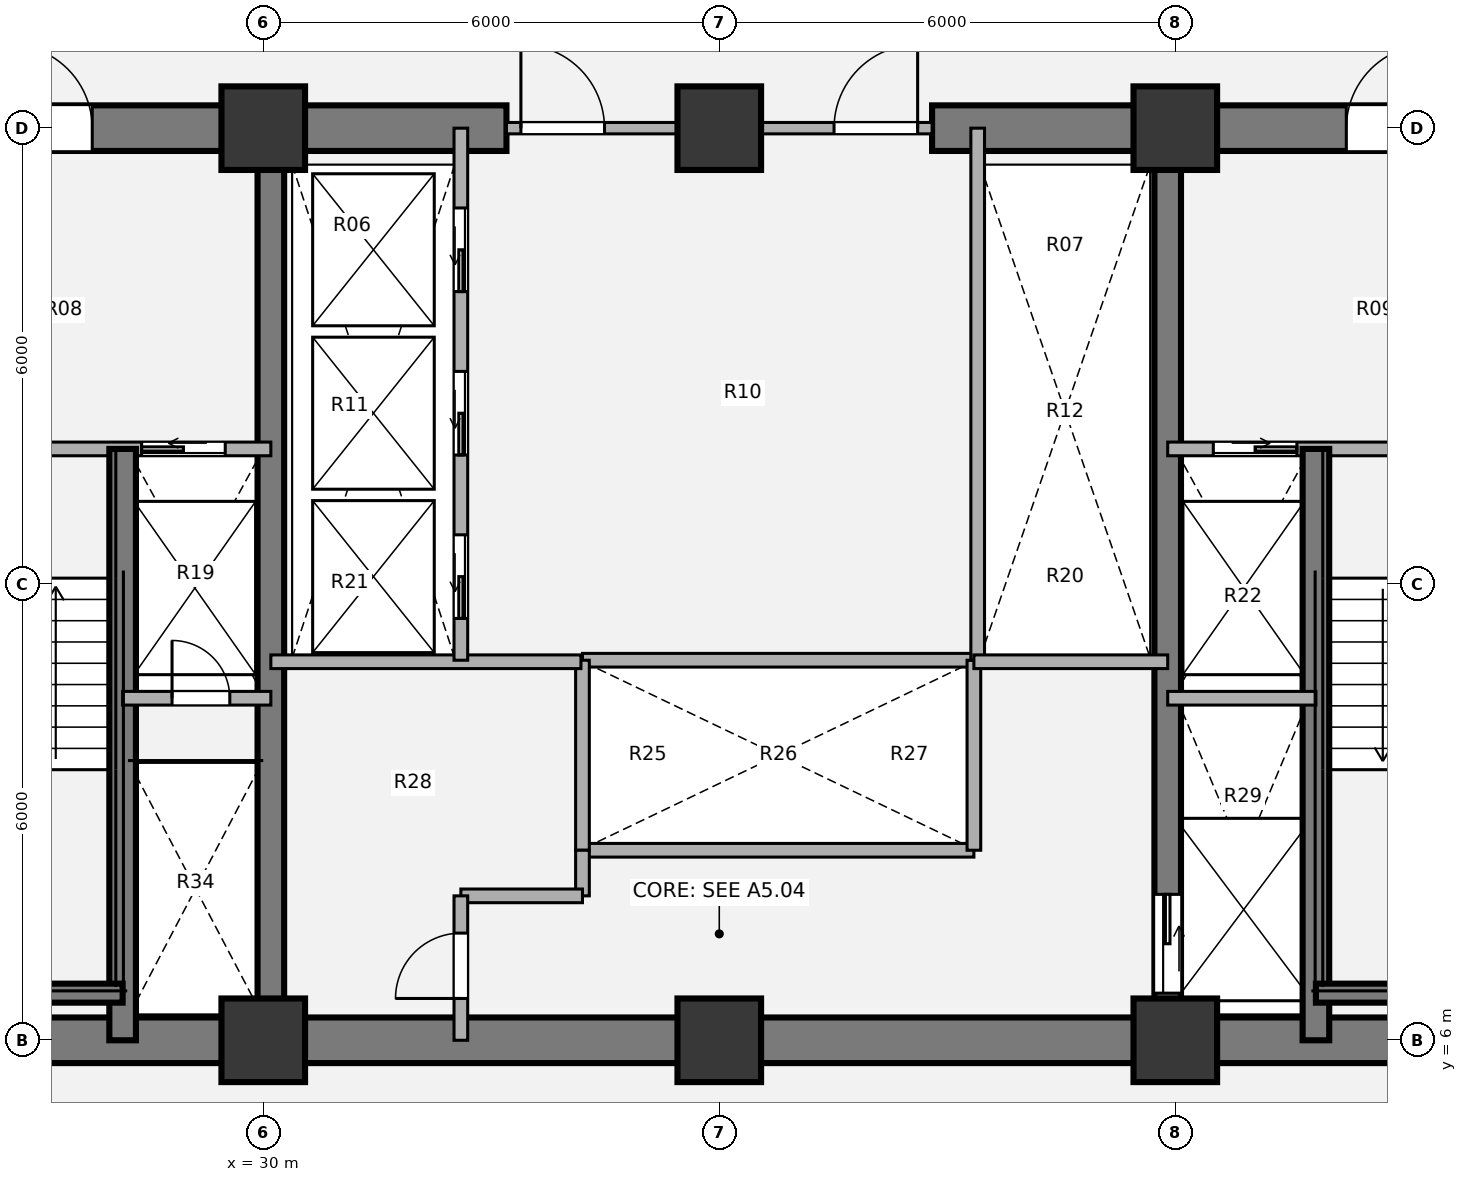
"""IFC4 building model, lengths in metres.
Left out: names, types, materials, properties, quantities, classifications, styles, units other than length and angle.
Written with IfcOpenShell. Run it as: python <this file> out.ifc"""

import sys

from ifc_helpers import new_model, si_unit, direction, frame, frame_2d, origin, origin_2d, place, context, subcontext, project, spatial, rectangle, extrude, source, transform, mapped, element, fill, save


model = new_model("IFC4")
c1 = context("Model", 3, precision=1e-05, world=origin(), true_north=direction((0.0, 1.0)))
c2 = subcontext(c1, "Body", "Model", "MODEL_VIEW")
j1 = project(units=[si_unit("LENGTHUNIT", "METRE"), si_unit("PLANEANGLEUNIT", "RADIAN")], contexts=[c1])
p1 = place(None, origin())
s1 = spatial("IfcSite", under=j1, at=p1, CompositionType="ELEMENT")
p2 = place(p1, origin())
s2 = spatial("IfcBuilding", under=s1, at=p2, CompositionType="ELEMENT")
p3 = place(p2, frame((0.0, 0.0, 53.46)))
s3 = spatial("IfcBuildingStorey", under=s2, at=p3, CompositionType="ELEMENT", Elevation=53.46)
m1 = source(origin(), c2, "Body", "SweptSolid", [
    extrude(rectangle(XDim=1.1, YDim=1.1, at=origin_2d()), origin(), (0.0, 0.0, 1.0), 3.78),
])
for number, where, z_axis, x_axis in (
    (1, (30.0, 6.0, 0.0), (0.0, 0.0, 1.0), (1.0, 0.0, 0.0)),
    (2, (36.0, 6.0, 0.0), (0.0, 0.0, 1.0), (1.0, 0.0, 0.0)),
    (3, (42.0, 6.0, 0.0), (0.0, 0.0, 1.0), (1.0, 0.0, 0.0)),
    (4, (30.0, 18.0, 0.0), (0.0, 0.0, 1.0), (1.0, 0.0, 0.0)),
    (5, (36.0, 18.0, 0.0), (0.0, 0.0, 1.0), (1.0, 0.0, 0.0)),
    (6, (42.0, 18.0, 0.0), (0.0, 0.0, 1.0), (1.0, 0.0, 0.0)),
):
    element("IfcColumn", number, at=place(p3, frame(where, z_axis=z_axis, x_axis=x_axis)), inside=s3, PredefinedType="COLUMN", context=c2, shape_type="MappedRepresentation", body=[
        mapped(m1, transform((0.0, 0.0, 0.0), x_axis=(1.0, 0.0, 0.0), y_axis=(0.0, 1.0, 0.0), z_axis=(0.0, 0.0, 1.0), scale=1.0)),
    ])
p4 = place(p3, frame((48.3, 6.0, 0.0), z_axis=(0.0, 0.0, 1.0), x_axis=(-1.0, 0.0, 0.0)))
e7 = element("IfcWall", 7, at=p4, inside=s3, PredefinedType="SHEAR", context=c2, shape_type="SweptSolid", body=[
    extrude(rectangle(XDim=24.6, YDim=0.6, at=frame_2d((12.3, 0.0))), origin(), (0.0, 0.0, 1.0), 3.78),
])
p5 = place(p3, frame((23.7, 18.0, 0.0), z_axis=(0.0, 0.0, 1.0), x_axis=(1.0, 0.0, 0.0)))
e8 = element("IfcWall", 8, at=p5, inside=s3, PredefinedType="SHEAR", context=c2, shape_type="SweptSolid", body=[
    extrude(rectangle(XDim=9.5, YDim=0.6, at=frame_2d((4.75, 0.0))), origin(), (0.0, 0.0, 1.0), 3.78),
])
p6 = place(p5, frame((2.95, 0.0, 0.0)))
e9 = element("IfcOpeningElement", 9, at=p6, cuts=e8, PredefinedType="OPENING", context=c2, shape_type="SweptSolid", body=[
    extrude(rectangle(XDim=1.1, YDim=2.1, at=origin_2d()), frame((0.55, 0.31, 1.05), z_axis=(0.0, -1.0, 0.0), x_axis=(1.0, 0.0, 0.0)), (0.0, 0.0, 1.0), 0.62),
])
p7 = place(p3, frame((38.8, 18.0, 0.0), z_axis=(0.0, 0.0, 1.0), x_axis=(1.0, 0.0, 0.0)))
e10 = element("IfcWall", 10, at=p7, inside=s3, PredefinedType="SHEAR", context=c2, shape_type="SweptSolid", body=[
    extrude(rectangle(XDim=9.5, YDim=0.6, at=frame_2d((4.75, 0.0))), origin(), (0.0, 0.0, 1.0), 3.78),
])
p8 = place(p7, frame((5.45, 0.0, 0.0)))
e11 = element("IfcOpeningElement", 11, at=p8, cuts=e10, PredefinedType="OPENING", context=c2, shape_type="SweptSolid", body=[
    extrude(rectangle(XDim=1.1, YDim=2.1, at=origin_2d()), frame((0.55, 0.31, 1.05), z_axis=(0.0, -1.0, 0.0), x_axis=(1.0, 0.0, 0.0)), (0.0, 0.0, 1.0), 0.62),
])
p9 = place(p3, frame((30.1, 6.0, 0.0), z_axis=(0.0, 0.0, 1.0), x_axis=(0.0, 1.0, 0.0)))
e12 = element("IfcWall", 12, at=p9, inside=s3, PredefinedType="SHEAR", context=c2, shape_type="SweptSolid", body=[
    extrude(rectangle(XDim=12.0, YDim=0.35, at=frame_2d((6.0, 0.0))), origin(), (0.0, 0.0, 1.0), 3.78),
])
p10 = place(p3, frame((41.9, 18.0, 0.0), z_axis=(0.0, 0.0, 1.0), x_axis=(0.0, -1.0, 0.0)))
e13 = element("IfcWall", 13, at=p10, inside=s3, PredefinedType="SHEAR", context=c2, shape_type="SweptSolid", body=[
    extrude(rectangle(XDim=12.0, YDim=0.35, at=frame_2d((6.0, 0.0))), origin(), (0.0, 0.0, 1.0), 3.78),
])
p11 = place(p10, frame((10.08, 0.0, 0.0)))
e14 = element("IfcOpeningElement", 14, at=p11, cuts=e13, PredefinedType="OPENING", context=c2, shape_type="SweptSolid", body=[
    extrude(rectangle(XDim=1.3, YDim=2.1, at=origin_2d()), frame((0.65, 0.185, 1.05), z_axis=(0.0, -1.0, 0.0), x_axis=(1.0, 0.0, 0.0)), (0.0, 0.0, 1.0), 0.37),
])
for number, where, z_axis, x_axis in (
    (15, (34.2, 11.0, 0.0), (0.0, 0.0, 1.0), (1.0, 0.0, 0.0)),
    (16, (34.2, 8.5, 0.0), (0.0, 0.0, 1.0), (1.0, 0.0, 0.0)),
):
    element("IfcWall", number, at=place(p3, frame(where, z_axis=z_axis, x_axis=x_axis)), inside=s3, PredefinedType="PARTITIONING", context=c2, shape_type="SweptSolid", body=[
        extrude(rectangle(XDim=5.15, YDim=0.18, at=frame_2d((2.575, 0.0))), origin(), (0.0, 0.0, 1.0), 3.5),
    ])
for number, where, z_axis, x_axis in (
    (17, (34.2, 8.5, 0.0), (0.0, 0.0, 1.0), (0.0, 1.0, 0.0)),
    (18, (39.35, 8.5, 0.0), (0.0, 0.0, 1.0), (0.0, 1.0, 0.0)),
):
    element("IfcWall", number, at=place(p3, frame(where, z_axis=z_axis, x_axis=x_axis)), inside=s3, PredefinedType="PARTITIONING", context=c2, shape_type="SweptSolid", body=[
        extrude(rectangle(XDim=2.5, YDim=0.18, at=frame_2d((1.25, 0.0))), origin(), (0.0, 0.0, 1.0), 3.5),
    ])
p12 = place(p3, frame((39.4, 11.0, 0.0), z_axis=(0.0, 0.0, 1.0), x_axis=(0.0, 1.0, 0.0)))
e19 = element("IfcWall", 19, at=p12, inside=s3, PredefinedType="PARTITIONING", context=c2, shape_type="SweptSolid", body=[
    extrude(rectangle(XDim=7.0, YDim=0.18, at=frame_2d((3.5, 0.0))), origin(), (0.0, 0.0, 1.0), 3.5),
])
p13 = place(p3, frame((30.1, 10.98, 0.0), z_axis=(0.0, 0.0, 1.0), x_axis=(1.0, 0.0, 0.0)))
e20 = element("IfcWall", 20, at=p13, inside=s3, PredefinedType="PARTITIONING", context=c2, shape_type="SweptSolid", body=[
    extrude(rectangle(XDim=4.08, YDim=0.18, at=frame_2d((2.04, 0.0))), origin(), (0.0, 0.0, 1.0), 3.5),
])
p14 = place(p3, frame((34.2, 7.9, 0.0), z_axis=(0.0, 0.0, 1.0), x_axis=(0.0, 1.0, 0.0)))
e21 = element("IfcWall", 21, at=p14, inside=s3, PredefinedType="PARTITIONING", context=c2, shape_type="SweptSolid", body=[
    extrude(rectangle(XDim=0.6, YDim=0.18, at=frame_2d((0.3, 0.0))), origin(), (0.0, 0.0, 1.0), 3.5),
])
p15 = place(p3, frame((32.6, 7.9, 0.0), z_axis=(0.0, 0.0, 1.0), x_axis=(1.0, 0.0, 0.0)))
e22 = element("IfcWall", 22, at=p15, inside=s3, PredefinedType="PARTITIONING", context=c2, shape_type="SweptSolid", body=[
    extrude(rectangle(XDim=1.6, YDim=0.18, at=frame_2d((0.8, 0.0))), origin(), (0.0, 0.0, 1.0), 3.5),
])
p16 = place(p3, frame((32.6, 6.0, 0.0), z_axis=(0.0, 0.0, 1.0), x_axis=(0.0, 1.0, 0.0)))
e23 = element("IfcWall", 23, at=p16, inside=s3, PredefinedType="PARTITIONING", context=c2, shape_type="SweptSolid", body=[
    extrude(rectangle(XDim=1.9, YDim=0.18, at=frame_2d((0.95, 0.0))), origin(), (0.0, 0.0, 1.0), 3.5),
])
p17 = place(p16, frame((0.55, 0.0, 0.0)))
e24 = element("IfcOpeningElement", 24, at=p17, cuts=e23, PredefinedType="OPENING", context=c2, shape_type="SweptSolid", body=[
    extrude(rectangle(XDim=0.86, YDim=2.1, at=origin_2d()), frame((0.43, 0.1, 1.05), z_axis=(0.0, -1.0, 0.0), x_axis=(1.0, 0.0, 0.0)), (0.0, 0.0, 1.0), 0.2),
])
p18 = place(p3, frame((39.35, 10.98, 0.0), z_axis=(0.0, 0.0, 1.0), x_axis=(1.0, 0.0, 0.0)))
e25 = element("IfcWall", 25, at=p18, inside=s3, PredefinedType="PARTITIONING", context=c2, shape_type="SweptSolid", body=[
    extrude(rectangle(XDim=2.55, YDim=0.18, at=frame_2d((1.275, 0.0))), origin(), (0.0, 0.0, 1.0), 3.5),
])
p19 = place(p3, frame((33.2, 18.0, 0.0), z_axis=(0.0, 0.0, 1.0), x_axis=(1.0, 0.0, 0.0)))
e26 = element("IfcWall", 26, at=p19, inside=s3, PredefinedType="PARTITIONING", context=c2, shape_type="SweptSolid", body=[
    extrude(rectangle(XDim=5.6, YDim=0.15, at=frame_2d((2.8, 0.0))), origin(), (0.0, 0.0, 1.0), 2.315),
])
p20 = place(p19, frame((0.19, 0.0, 0.0)))
e27 = element("IfcOpeningElement", 27, at=p20, cuts=e26, PredefinedType="OPENING", context=c2, shape_type="SweptSolid", body=[
    extrude(rectangle(XDim=1.1, YDim=2.1, at=origin_2d()), frame((0.55, 0.085, 1.05), z_axis=(0.0, -1.0, 0.0), x_axis=(1.0, 0.0, 0.0)), (0.0, 0.0, 1.0), 0.17),
])
p21 = place(p19, frame((4.31, 0.0, 0.0)))
e28 = element("IfcOpeningElement", 28, at=p21, cuts=e26, PredefinedType="OPENING", context=c2, shape_type="SweptSolid", body=[
    extrude(rectangle(XDim=1.1, YDim=2.1, at=origin_2d()), frame((0.55, 0.085, 1.05), z_axis=(0.0, -1.0, 0.0), x_axis=(1.0, 0.0, 0.0)), (0.0, 0.0, 1.0), 0.17),
])
p22 = place(p3, frame((24.0, 13.78, 0.0), z_axis=(0.0, 0.0, 1.0), x_axis=(1.0, 0.0, 0.0)))
e29 = element("IfcWall", 29, at=p22, inside=s3, PredefinedType="PARTITIONING", context=c2, shape_type="SweptSolid", body=[
    extrude(rectangle(XDim=6.1, YDim=0.18, at=frame_2d((3.05, 0.0))), origin(), (0.0, 0.0, 1.0), 3.5),
])
p23 = place(p22, frame((1.15, 0.0, 0.0)))
e30 = element("IfcOpeningElement", 30, at=p23, cuts=e29, PredefinedType="OPENING", context=c2, shape_type="SweptSolid", body=[
    extrude(rectangle(XDim=1.1, YDim=2.1, at=origin_2d()), frame((0.55, 0.1, 1.05), z_axis=(0.0, -1.0, 0.0), x_axis=(1.0, 0.0, 0.0)), (0.0, 0.0, 1.0), 0.2),
])
p24 = place(p22, frame((4.4, 0.0, 0.0)))
e31 = element("IfcOpeningElement", 31, at=p24, cuts=e29, PredefinedType="OPENING", context=c2, shape_type="SweptSolid", body=[
    extrude(rectangle(XDim=1.1, YDim=2.1, at=origin_2d()), frame((0.55, 0.1, 1.05), z_axis=(0.0, -1.0, 0.0), x_axis=(1.0, 0.0, 0.0)), (0.0, 0.0, 1.0), 0.2),
])
p25 = place(p3, frame((28.15, 6.0, 0.0), z_axis=(0.0, 0.0, 1.0), x_axis=(0.0, 1.0, 0.0)))
e32 = element("IfcWall", 32, at=p25, inside=s3, PredefinedType="SHEAR", context=c2, shape_type="SweptSolid", body=[
    extrude(rectangle(XDim=7.78, YDim=0.35, at=frame_2d((3.89, 0.0))), origin(), (0.0, 0.0, 1.0), 3.85),
])
p26 = place(p3, frame((24.58, 6.62, 0.0), z_axis=(0.0, 0.0, 1.0), x_axis=(1.0, 0.0, 0.0)))
e33 = element("IfcWall", 33, at=p26, inside=s3, PredefinedType="SHEAR", context=c2, shape_type="SweptSolid", body=[
    extrude(rectangle(XDim=3.57, YDim=0.25, at=frame_2d((1.785, 0.0))), origin(), (0.0, 0.0, 1.0), 3.85),
])
p27 = place(p3, frame((28.15, 10.5, 0.0), z_axis=(0.0, 0.0, 1.0), x_axis=(1.0, 0.0, 0.0)))
e34 = element("IfcWall", 34, at=p27, inside=s3, PredefinedType="PARTITIONING", context=c2, shape_type="SweptSolid", body=[
    extrude(rectangle(XDim=1.95, YDim=0.18, at=frame_2d((0.975, 0.0))), origin(), (0.0, 0.0, 1.0), 3.5),
])
p28 = place(p27, frame((0.65, 0.0, 0.0)))
e35 = element("IfcOpeningElement", 35, at=p28, cuts=e34, PredefinedType="OPENING", context=c2, shape_type="SweptSolid", body=[
    extrude(rectangle(XDim=0.76, YDim=2.05, at=origin_2d()), frame((0.38, 0.1, 1.025), z_axis=(0.0, -1.0, 0.0), x_axis=(1.0, 0.0, 0.0)), (0.0, 0.0, 1.0), 0.2),
])
p29 = place(p3, frame((41.9, 13.78, 0.0), z_axis=(0.0, 0.0, 1.0), x_axis=(1.0, 0.0, 0.0)))
e36 = element("IfcWall", 36, at=p29, inside=s3, PredefinedType="PARTITIONING", context=c2, shape_type="SweptSolid", body=[
    extrude(rectangle(XDim=6.1, YDim=0.18, at=frame_2d((3.05, 0.0))), origin(), (0.0, 0.0, 1.0), 3.5),
])
p30 = place(p29, frame((0.6, 0.0, 0.0)))
e37 = element("IfcOpeningElement", 37, at=p30, cuts=e36, PredefinedType="OPENING", context=c2, shape_type="SweptSolid", body=[
    extrude(rectangle(XDim=1.1, YDim=2.1, at=origin_2d()), frame((0.55, 0.1, 1.05), z_axis=(0.0, -1.0, 0.0), x_axis=(1.0, 0.0, 0.0)), (0.0, 0.0, 1.0), 0.2),
])
p31 = place(p29, frame((3.8, 0.0, 0.0)))
e38 = element("IfcOpeningElement", 38, at=p31, cuts=e36, PredefinedType="OPENING", context=c2, shape_type="SweptSolid", body=[
    extrude(rectangle(XDim=1.1, YDim=2.1, at=origin_2d()), frame((0.55, 0.1, 1.05), z_axis=(0.0, -1.0, 0.0), x_axis=(1.0, 0.0, 0.0)), (0.0, 0.0, 1.0), 0.2),
])
p32 = place(p3, frame((43.85, 6.0, 0.0), z_axis=(0.0, 0.0, 1.0), x_axis=(0.0, 1.0, 0.0)))
e39 = element("IfcWall", 39, at=p32, inside=s3, PredefinedType="SHEAR", context=c2, shape_type="SweptSolid", body=[
    extrude(rectangle(XDim=7.78, YDim=0.35, at=frame_2d((3.89, 0.0))), origin(), (0.0, 0.0, 1.0), 3.85),
])
p33 = place(p3, frame((43.85, 6.62, 0.0), z_axis=(0.0, 0.0, 1.0), x_axis=(1.0, 0.0, 0.0)))
e40 = element("IfcWall", 40, at=p33, inside=s3, PredefinedType="SHEAR", context=c2, shape_type="SweptSolid", body=[
    extrude(rectangle(XDim=3.57, YDim=0.25, at=frame_2d((1.785, 0.0))), origin(), (0.0, 0.0, 1.0), 3.85),
])
p34 = place(p3, frame((41.9, 10.5, 0.0), z_axis=(0.0, 0.0, 1.0), x_axis=(1.0, 0.0, 0.0)))
e41 = element("IfcWall", 41, at=p34, inside=s3, PredefinedType="PARTITIONING", context=c2, shape_type="SweptSolid", body=[
    extrude(rectangle(XDim=1.95, YDim=0.18, at=frame_2d((0.975, 0.0))), origin(), (0.0, 0.0, 1.0), 3.5),
])
p35 = place(p3, frame((32.6, 11.0, 0.0), z_axis=(0.0, 0.0, 1.0), x_axis=(0.0, 1.0, 0.0)))
e42 = element("IfcWall", 42, at=p35, inside=s3, PredefinedType="PARTITIONING", context=c2, shape_type="SweptSolid", body=[
    extrude(rectangle(XDim=7.0, YDim=0.18, at=frame_2d((3.5, 0.0))), origin(), (0.0, 0.0, 1.0), 3.5),
])
p36 = place(p35, frame((0.55, 0.0, 0.0)))
e43 = element("IfcOpeningElement", 43, at=p36, cuts=e42, PredefinedType="OPENING", context=c2, shape_type="SweptSolid", body=[
    extrude(rectangle(XDim=1.1, YDim=2.1, at=origin_2d()), frame((0.55, 0.1, 1.05), z_axis=(0.0, -1.0, 0.0), x_axis=(1.0, 0.0, 0.0)), (0.0, 0.0, 1.0), 0.2),
])
p37 = place(p35, frame((2.7, 0.0, 0.0)))
e44 = element("IfcOpeningElement", 44, at=p37, cuts=e42, PredefinedType="OPENING", context=c2, shape_type="SweptSolid", body=[
    extrude(rectangle(XDim=1.1, YDim=2.1, at=origin_2d()), frame((0.55, 0.1, 1.05), z_axis=(0.0, -1.0, 0.0), x_axis=(1.0, 0.0, 0.0)), (0.0, 0.0, 1.0), 0.2),
])
p38 = place(p35, frame((4.85, 0.0, 0.0)))
e45 = element("IfcOpeningElement", 45, at=p38, cuts=e42, PredefinedType="OPENING", context=c2, shape_type="SweptSolid", body=[
    extrude(rectangle(XDim=1.1, YDim=2.1, at=origin_2d()), frame((0.55, 0.1, 1.05), z_axis=(0.0, -1.0, 0.0), x_axis=(1.0, 0.0, 0.0)), (0.0, 0.0, 1.0), 0.2),
])
m2 = source(origin(), c2, "Body", "SweptSolid", [
    extrude(rectangle(XDim=0.86, YDim=2.1, at=origin_2d()), frame((0.43, 0.025, 1.05), z_axis=(0.0, -1.0, 0.0), x_axis=(1.0, 0.0, 0.0)), (0.0, 0.0, 1.0), 0.05),
])
p39 = place(p17, origin())
e46 = element("IfcDoor", 46, at=p39, inside=s3, OperationType="SINGLE_SWING_LEFT", PredefinedType="DOOR", context=c2, shape_type="MappedRepresentation", body=[
    mapped(m2, transform((0.0, 0.0, 0.0), x_axis=(1.0, 0.0, 0.0), y_axis=(0.0, 1.0, 0.0), z_axis=(0.0, 0.0, 1.0), scale=1.0)),
])
fill(e24, e46)
m3 = source(origin(), c2, "Body", "SweptSolid", [
    extrude(rectangle(XDim=1.1, YDim=2.1, at=origin_2d()), frame((0.55, 0.025, 1.05), z_axis=(0.0, -1.0, 0.0), x_axis=(1.0, 0.0, 0.0)), (0.0, 0.0, 1.0), 0.05),
])
p40 = place(p20, origin())
e47 = element("IfcDoor", 47, at=p40, inside=s3, OperationType="SINGLE_SWING_LEFT", PredefinedType="DOOR", context=c2, shape_type="MappedRepresentation", body=[
    mapped(m3, transform((0.0, 0.0, 0.0), x_axis=(1.0, 0.0, 0.0), y_axis=(0.0, 1.0, 0.0), z_axis=(0.0, 0.0, 1.0), scale=1.0)),
])
fill(e27, e47)
p41 = place(p21, origin())
e48 = element("IfcDoor", 48, at=p41, inside=s3, OperationType="SINGLE_SWING_RIGHT", PredefinedType="DOOR", context=c2, shape_type="MappedRepresentation", body=[
    mapped(m3, transform((0.0, 0.0, 0.0), x_axis=(1.0, 0.0, 0.0), y_axis=(0.0, 1.0, 0.0), z_axis=(0.0, 0.0, 1.0), scale=1.0)),
])
fill(e28, e48)
m4 = source(origin(), c2, "Body", "SweptSolid", [
    extrude(rectangle(XDim=1.1, YDim=2.1, at=origin_2d()), frame((0.55, 0.025, 1.05), z_axis=(0.0, -1.0, 0.0), x_axis=(1.0, 0.0, 0.0)), (0.0, 0.0, 1.0), 0.05),
])
p42 = place(p24, origin())
e49 = element("IfcDoor", 49, at=p42, inside=s3, OperationType="SLIDING_TO_LEFT", PredefinedType="DOOR", context=c2, shape_type="MappedRepresentation", body=[
    mapped(m4, transform((0.0, 0.0, 0.0), x_axis=(1.0, 0.0, 0.0), y_axis=(0.0, 1.0, 0.0), z_axis=(0.0, 0.0, 1.0), scale=1.0)),
])
fill(e31, e49)
m5 = source(origin(), c2, "Body", "SweptSolid", [
    extrude(rectangle(XDim=0.76, YDim=2.05, at=origin_2d()), frame((0.38, 0.025, 1.025), z_axis=(0.0, -1.0, 0.0), x_axis=(1.0, 0.0, 0.0)), (0.0, 0.0, 1.0), 0.05),
])
p43 = place(p28, origin())
e50 = element("IfcDoor", 50, at=p43, inside=s3, OperationType="SINGLE_SWING_LEFT", PredefinedType="DOOR", context=c2, shape_type="MappedRepresentation", body=[
    mapped(m5, transform((0.0, 0.0, 0.0), x_axis=(1.0, 0.0, 0.0), y_axis=(0.0, 1.0, 0.0), z_axis=(0.0, 0.0, 1.0), scale=1.0)),
])
fill(e35, e50)
p44 = place(p30, origin())
e51 = element("IfcDoor", 51, at=p44, inside=s3, OperationType="SLIDING_TO_RIGHT", PredefinedType="DOOR", context=c2, shape_type="MappedRepresentation", body=[
    mapped(m4, transform((0.0, 0.0, 0.0), x_axis=(1.0, 0.0, 0.0), y_axis=(0.0, 1.0, 0.0), z_axis=(0.0, 0.0, 1.0), scale=1.0)),
])
fill(e37, e51)
m6 = source(origin(), c2, "Body", "SweptSolid", [
    extrude(rectangle(XDim=1.3, YDim=2.1, at=origin_2d()), frame((0.65, 0.025, 1.05), z_axis=(0.0, -1.0, 0.0), x_axis=(1.0, 0.0, 0.0)), (0.0, 0.0, 1.0), 0.05),
])
p45 = place(p11, origin())
e52 = element("IfcDoor", 52, at=p45, inside=s3, OperationType="SLIDING_TO_LEFT", PredefinedType="DOOR", context=c2, shape_type="MappedRepresentation", body=[
    mapped(m6, transform((0.0, 0.0, 0.0), x_axis=(1.0, 0.0, 0.0), y_axis=(0.0, 1.0, 0.0), z_axis=(0.0, 0.0, 1.0), scale=1.0)),
])
fill(e14, e52)
p46 = place(p6, origin())
e53 = element("IfcDoor", 53, at=p46, inside=s3, OperationType="SINGLE_SWING_LEFT", PredefinedType="DOOR", context=c2, shape_type="MappedRepresentation", body=[
    mapped(m3, transform((0.0, 0.0, 0.0), x_axis=(1.0, 0.0, 0.0), y_axis=(0.0, 1.0, 0.0), z_axis=(0.0, 0.0, 1.0), scale=1.0)),
])
fill(e9, e53)
p47 = place(p8, origin())
e54 = element("IfcDoor", 54, at=p47, inside=s3, OperationType="SINGLE_SWING_RIGHT", PredefinedType="DOOR", context=c2, shape_type="MappedRepresentation", body=[
    mapped(m3, transform((0.0, 0.0, 0.0), x_axis=(1.0, 0.0, 0.0), y_axis=(0.0, 1.0, 0.0), z_axis=(0.0, 0.0, 1.0), scale=1.0)),
])
fill(e11, e54)
p48 = place(p36, origin())
e55 = element("IfcDoor", 55, at=p48, inside=s3, OperationType="SLIDING_TO_LEFT", PredefinedType="DOOR", context=c2, shape_type="MappedRepresentation", body=[
    mapped(m4, transform((0.0, 0.0, 0.0), x_axis=(1.0, 0.0, 0.0), y_axis=(0.0, 1.0, 0.0), z_axis=(0.0, 0.0, 1.0), scale=1.0)),
])
fill(e43, e55)
p49 = place(p37, origin())
e56 = element("IfcDoor", 56, at=p49, inside=s3, OperationType="SLIDING_TO_LEFT", PredefinedType="DOOR", context=c2, shape_type="MappedRepresentation", body=[
    mapped(m4, transform((0.0, 0.0, 0.0), x_axis=(1.0, 0.0, 0.0), y_axis=(0.0, 1.0, 0.0), z_axis=(0.0, 0.0, 1.0), scale=1.0)),
])
fill(e44, e56)
p50 = place(p38, origin())
e57 = element("IfcDoor", 57, at=p50, inside=s3, OperationType="SLIDING_TO_LEFT", PredefinedType="DOOR", context=c2, shape_type="MappedRepresentation", body=[
    mapped(m4, transform((0.0, 0.0, 0.0), x_axis=(1.0, 0.0, 0.0), y_axis=(0.0, 1.0, 0.0), z_axis=(0.0, 0.0, 1.0), scale=1.0)),
])
fill(e45, e57)
save(model, sys.argv[1])
